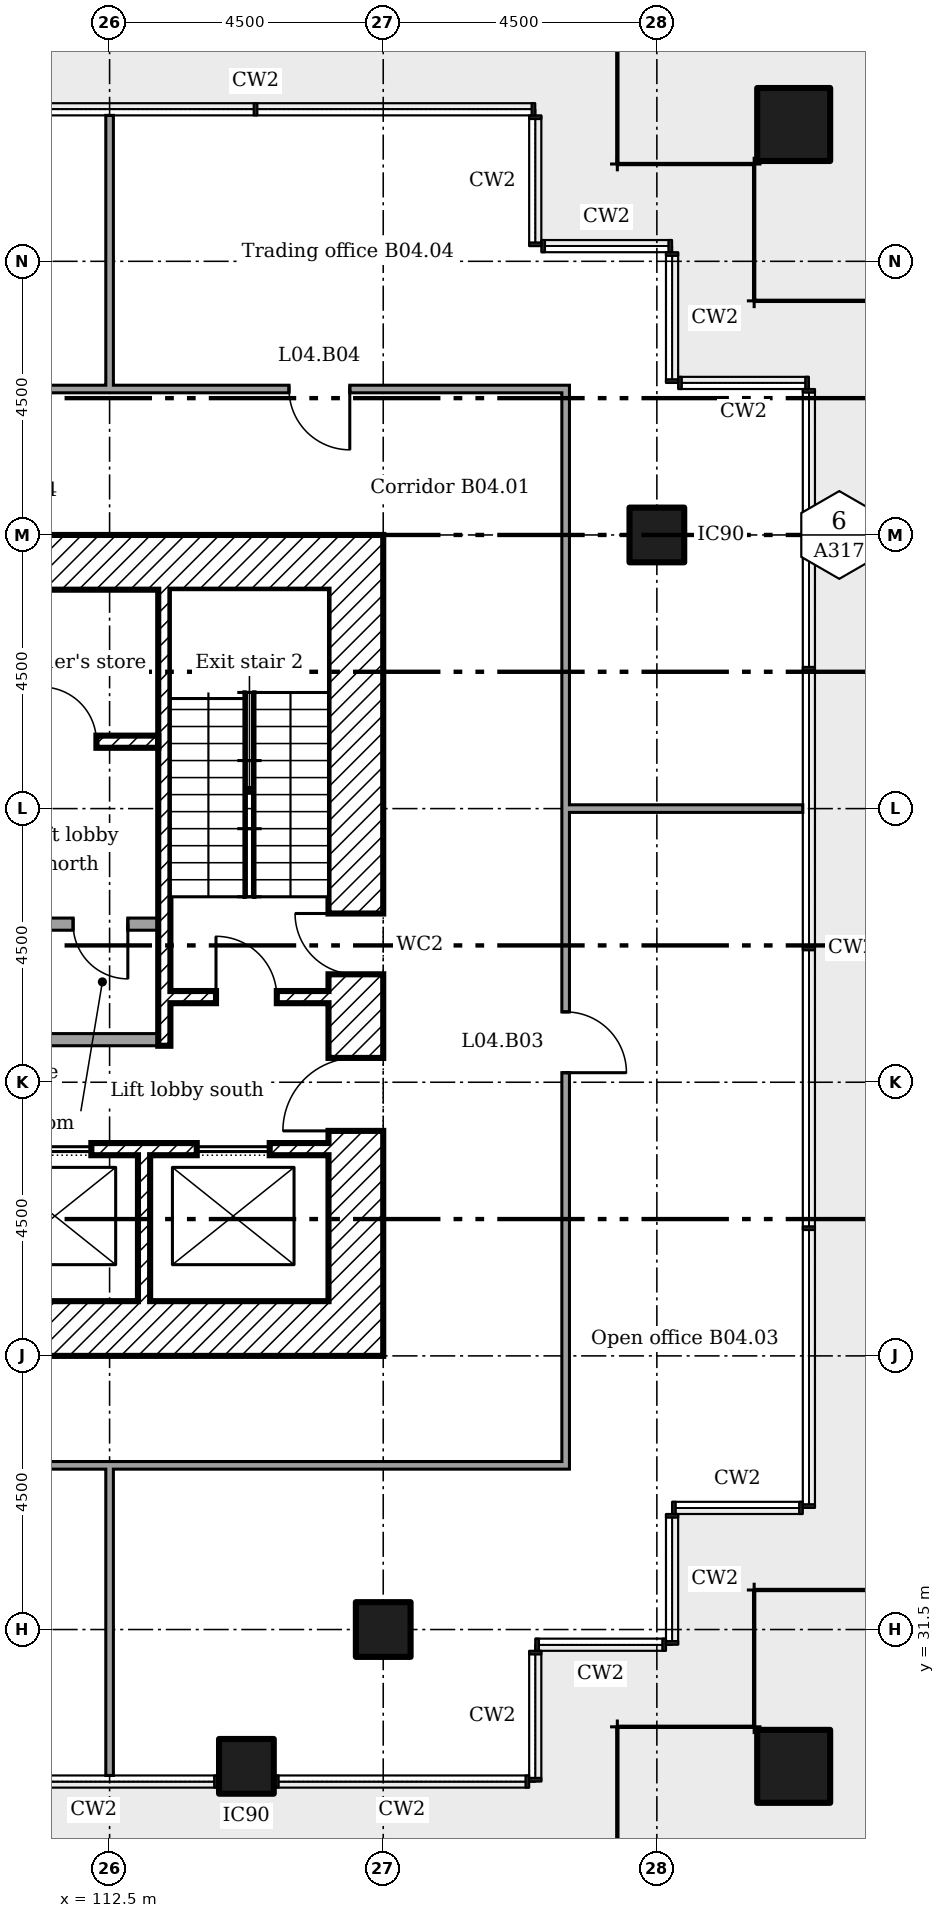
"""IFC4 building model, lengths in metres.
Left out: names, types, materials, properties, quantities, classifications, styles, units other than length and angle.
Written with IfcOpenShell. Run it as: python <this file> out.ifc"""

import sys

from ifc_helpers import new_model, si_unit, direction, frame, frame_2d, origin, origin_2d, place, context, subcontext, project, spatial, rectangle, extrude, element, fill, save


model = new_model("IFC4")
c1 = context("Model", 3, precision=1e-05, world=origin(), true_north=direction((0.0, 1.0)))
c2 = subcontext(c1, "Body", "Model", "MODEL_VIEW")
j1 = project(units=[si_unit("LENGTHUNIT", "METRE"), si_unit("PLANEANGLEUNIT", "RADIAN")], contexts=[c1])
p1 = place(None, origin())
s1 = spatial("IfcSite", under=j1, at=p1, CompositionType="ELEMENT")
p2 = place(p1, origin())
s2 = spatial("IfcBuilding", under=s1, at=p2, CompositionType="ELEMENT")
p3 = place(p2, frame((0.0, 0.0, 21.0)))
s3 = spatial("IfcBuildingStorey", under=s2, at=p3, CompositionType="ELEMENT", Elevation=21.0)
for number, where in (
    (1, (123.75, 29.25, 0.0)),
    (2, (123.75, 56.25, 0.0)),
):
    element("IfcColumn", number, at=place(p3, frame(where)), inside=s3, PredefinedType="COLUMN", context=c2, shape_type="SweptSolid", body=[
        extrude(rectangle(XDim=1.2, YDim=1.2, at=origin_2d()), origin(), (0.0, 0.0, 1.0), 4.4),
    ])
for number, where in (
    (3, (114.75, 29.25, 0.0)),
    (4, (117.0, 31.5, 0.0)),
    (5, (121.5, 49.5, 0.0)),
):
    element("IfcColumn", number, at=place(p3, frame(where)), inside=s3, PredefinedType="COLUMN", context=c2, shape_type="SweptSolid", body=[
        extrude(rectangle(XDim=0.9, YDim=0.9, at=origin_2d()), origin(), (0.0, 0.0, 1.0), 4.4),
    ])
p4 = place(p3, frame((116.55, 36.0, 0.0), z_axis=(0.0, 0.0, 1.0), x_axis=(0.0, 1.0, 0.0)))
e6 = element("IfcWall", 6, at=p4, inside=s3, PredefinedType="SHEAR", context=c2, shape_type="SweptSolid", body=[
    extrude(rectangle(XDim=13.5, YDim=0.9, at=frame_2d((6.75, 0.0))), origin(), (0.0, 0.0, 1.0), 4.125),
])
p5 = place(p4, frame((3.7, 0.0, 0.0)))
e7 = element("IfcOpeningElement", 7, at=p5, cuts=e6, PredefinedType="OPENING", context=c2, shape_type="SweptSolid", body=[
    extrude(rectangle(XDim=1.2, YDim=2.1, at=frame_2d((0.6, 1.05))), frame((0.0, 0.46, 0.0), z_axis=(0.0, -1.0, 0.0), x_axis=(1.0, 0.0, 0.0)), (0.0, 0.0, 1.0), 0.92),
])
p6 = place(p4, frame((6.275, 0.0, 0.0)))
e8 = element("IfcOpeningElement", 8, at=p6, cuts=e6, PredefinedType="OPENING", context=c2, shape_type="SweptSolid", body=[
    extrude(rectangle(XDim=1.0, YDim=2.1, at=frame_2d((0.5, 1.05))), frame((0.0, 0.46, 0.0), z_axis=(0.0, -1.0, 0.0), x_axis=(1.0, 0.0, 0.0)), (0.0, 0.0, 1.0), 0.92),
])
for number, where in (
    (9, (104.4, 49.05, 0.0)),
    (10, (104.4, 36.45, 0.0)),
):
    element("IfcWall", number, at=place(p3, frame(where)), inside=s3, PredefinedType="SHEAR", context=c2, shape_type="SweptSolid", body=[
        extrude(rectangle(XDim=11.7, YDim=0.9, at=frame_2d((5.85, 0.0))), origin(), (0.0, 0.0, 1.0), 4.125),
    ])
p7 = place(p3, frame((113.067, 36.9, 0.0), z_axis=(0.0, 0.0, 1.0), x_axis=(0.0, 1.0, 0.0)))
e11 = element("IfcWall", 11, at=p7, inside=s3, PredefinedType="SHEAR", context=c2, shape_type="SweptSolid", body=[
    extrude(rectangle(XDim=2.4, YDim=0.2, at=frame_2d((1.2, 0.0))), origin(), (0.0, 0.0, 1.0), 4.125),
])
p8 = place(p3, frame((110.467, 46.1, 0.0)))
e12 = element("IfcWall", 12, at=p8, inside=s3, PredefinedType="SHEAR", context=c2, shape_type="SweptSolid", body=[
    extrude(rectangle(XDim=2.833, YDim=0.2, at=frame_2d((1.417, 0.0))), origin(), (0.0, 0.0, 1.0), 4.125),
])
p9 = place(p8, frame((0.917, 0.0, 0.0)))
e13 = element("IfcOpeningElement", 13, at=p9, cuts=e12, PredefinedType="OPENING", context=c2, shape_type="SweptSolid", body=[
    extrude(rectangle(XDim=0.9, YDim=2.1, at=frame_2d((0.45, 1.05))), frame((0.0, 0.11, 0.0), z_axis=(0.0, -1.0, 0.0), x_axis=(1.0, 0.0, 0.0)), (0.0, 0.0, 1.0), 0.22),
])
p10 = place(p3, frame((107.2, 39.4, 0.0)))
e14 = element("IfcWall", 14, at=p10, inside=s3, PredefinedType="SHEAR", context=c2, shape_type="SweptSolid", body=[
    extrude(rectangle(XDim=8.9, YDim=0.2, at=frame_2d((4.45, 0.0))), origin(), (0.0, 0.0, 1.0), 4.125),
])
p11 = place(p10, frame((0.867, 0.0, 0.0)))
e15 = element("IfcOpeningElement", 15, at=p11, cuts=e14, PredefinedType="OPENING", context=c2, shape_type="SweptSolid", body=[
    extrude(rectangle(XDim=1.2, YDim=2.1, at=frame_2d((0.6, 1.05))), frame((0.0, 0.11, 0.0), z_axis=(0.0, -1.0, 0.0), x_axis=(1.0, 0.0, 0.0)), (0.0, 0.0, 1.0), 0.22),
])
p12 = place(p10, frame((3.8, 0.0, 0.0)))
e16 = element("IfcOpeningElement", 16, at=p12, cuts=e14, PredefinedType="OPENING", context=c2, shape_type="SweptSolid", body=[
    extrude(rectangle(XDim=1.2, YDim=2.1, at=frame_2d((0.6, 1.05))), frame((0.0, 0.11, 0.0), z_axis=(0.0, -1.0, 0.0), x_axis=(1.0, 0.0, 0.0)), (0.0, 0.0, 1.0), 0.22),
])
p13 = place(p10, frame((6.733, 0.0, 0.0)))
e17 = element("IfcOpeningElement", 17, at=p13, cuts=e14, PredefinedType="OPENING", context=c2, shape_type="SweptSolid", body=[
    extrude(rectangle(XDim=1.2, YDim=2.1, at=frame_2d((0.6, 1.05))), frame((0.0, 0.11, 0.0), z_axis=(0.0, -1.0, 0.0), x_axis=(1.0, 0.0, 0.0)), (0.0, 0.0, 1.0), 0.22),
])
p14 = place(p3, frame((113.5, 41.9, 0.0)))
e18 = element("IfcWall", 18, at=p14, inside=s3, PredefinedType="SHEAR", context=c2, shape_type="SweptSolid", body=[
    extrude(rectangle(XDim=2.6, YDim=0.2, at=frame_2d((1.3, 0.0))), origin(), (0.0, 0.0, 1.0), 4.125),
])
p15 = place(p14, frame((0.75, 0.0, 0.0)))
e19 = element("IfcOpeningElement", 19, at=p15, cuts=e18, PredefinedType="OPENING", context=c2, shape_type="SweptSolid", body=[
    extrude(rectangle(XDim=1.0, YDim=2.1, at=frame_2d((0.5, 1.05))), frame((0.0, 0.11, 0.0), z_axis=(0.0, -1.0, 0.0), x_axis=(1.0, 0.0, 0.0)), (0.0, 0.0, 1.0), 0.22),
])
p16 = place(p3, frame((113.4, 41.1, 0.0), z_axis=(0.0, 0.0, 1.0), x_axis=(0.0, 1.0, 0.0)))
e20 = element("IfcWall", 20, at=p16, inside=s3, PredefinedType="SHEAR", context=c2, shape_type="SweptSolid", body=[
    extrude(rectangle(XDim=7.5, YDim=0.2, at=frame_2d((3.75, 0.0))), origin(), (0.0, 0.0, 1.0), 4.125),
])
p17 = place(p3, frame((107.2, 43.1, 0.0)))
e21 = element("IfcWall", 21, at=p17, inside=s3, PredefinedType="PARTITIONING", context=c2, shape_type="SweptSolid", body=[
    extrude(rectangle(XDim=6.1, YDim=0.2, at=frame_2d((3.05, 0.0))), origin(), (0.0, 0.0, 1.0), 4.125),
])
p18 = place(p17, frame((4.7, 0.0, 0.0)))
e22 = element("IfcOpeningElement", 22, at=p18, cuts=e21, PredefinedType="OPENING", context=c2, shape_type="SweptSolid", body=[
    extrude(rectangle(XDim=0.9, YDim=2.1, at=frame_2d((0.45, 1.05))), frame((0.0, 0.11, 0.0), z_axis=(0.0, -1.0, 0.0), x_axis=(1.0, 0.0, 0.0)), (0.0, 0.0, 1.0), 0.22),
])
p19 = place(p3, frame((107.2, 41.2, 0.0)))
e23 = element("IfcWall", 23, at=p19, inside=s3, PredefinedType="PARTITIONING", context=c2, shape_type="SweptSolid", body=[
    extrude(rectangle(XDim=6.1, YDim=0.2, at=frame_2d((3.05, 0.0))), origin(), (0.0, 0.0, 1.0), 4.125),
])
p20 = place(p19, frame((0.7, 0.0, 0.0)))
e24 = element("IfcOpeningElement", 24, at=p20, cuts=e23, PredefinedType="OPENING", context=c2, shape_type="SweptSolid", body=[
    extrude(rectangle(XDim=0.9, YDim=2.1, at=frame_2d((0.45, 1.05))), frame((0.0, 0.11, 0.0), z_axis=(0.0, -1.0, 0.0), x_axis=(1.0, 0.0, 0.0)), (0.0, 0.0, 1.0), 0.22),
])
p21 = place(p19, frame((2.8, 0.0, 0.0)))
e25 = element("IfcOpeningElement", 25, at=p21, cuts=e23, PredefinedType="OPENING", context=c2, shape_type="SweptSolid", body=[
    extrude(rectangle(XDim=0.9, YDim=2.1, at=frame_2d((0.45, 1.05))), frame((0.0, 0.11, 0.0), z_axis=(0.0, -1.0, 0.0), x_axis=(1.0, 0.0, 0.0)), (0.0, 0.0, 1.0), 0.22),
])
p22 = place(p3, frame((101.038, 34.2, 0.0)))
e26 = element("IfcWall", 26, at=p22, inside=s3, PredefinedType="PARTITIONING", context=c2, shape_type="SweptSolid", body=[
    extrude(rectangle(XDim=19.025, YDim=0.125, at=frame_2d((9.512, 0.0))), origin(), (0.0, 0.0, 1.0), 4.225),
])
p23 = place(p22, frame((5.219, 0.0, 0.0)))
e27 = element("IfcOpeningElement", 27, at=p23, cuts=e26, PredefinedType="OPENING", context=c2, shape_type="SweptSolid", body=[
    extrude(rectangle(XDim=1.0, YDim=2.1, at=frame_2d((0.5, 1.05))), frame((0.0, 0.073, 0.0), z_axis=(0.0, -1.0, 0.0), x_axis=(1.0, 0.0, 0.0)), (0.0, 0.0, 1.0), 0.145),
])
p24 = place(p3, frame((120.0, 45.0, 0.0)))
e28 = element("IfcWall", 28, at=p24, inside=s3, PredefinedType="PARTITIONING", context=c2, shape_type="SweptSolid", body=[
    extrude(rectangle(XDim=3.9, YDim=0.125, at=frame_2d((1.95, 0.0))), origin(), (0.0, 0.0, 1.0), 3.613),
])
p25 = place(p3, frame((101.038, 51.9, 0.0)))
e29 = element("IfcWall", 29, at=p25, inside=s3, PredefinedType="PARTITIONING", context=c2, shape_type="SweptSolid", body=[
    extrude(rectangle(XDim=19.025, YDim=0.125, at=frame_2d((9.512, 0.0))), origin(), (0.0, 0.0, 1.0), 4.225),
])
p26 = place(p25, frame((14.413, 0.0, 0.0)))
e30 = element("IfcOpeningElement", 30, at=p26, cuts=e29, PredefinedType="OPENING", context=c2, shape_type="SweptSolid", body=[
    extrude(rectangle(XDim=1.0, YDim=2.1, at=frame_2d((0.5, 1.05))), frame((0.0, 0.073, 0.0), z_axis=(0.0, -1.0, 0.0), x_axis=(1.0, 0.0, 0.0)), (0.0, 0.0, 1.0), 0.145),
])
p27 = place(p25, frame((5.219, 0.0, 0.0)))
e31 = element("IfcOpeningElement", 31, at=p27, cuts=e29, PredefinedType="OPENING", context=c2, shape_type="SweptSolid", body=[
    extrude(rectangle(XDim=1.0, YDim=2.1, at=frame_2d((0.5, 1.05))), frame((0.0, 0.073, 0.0), z_axis=(0.0, -1.0, 0.0), x_axis=(1.0, 0.0, 0.0)), (0.0, 0.0, 1.0), 0.145),
])
p28 = place(p3, frame((112.5, 29.1, 0.0), z_axis=(0.0, 0.0, 1.0), x_axis=(0.0, 1.0, 0.0)))
e32 = element("IfcWall", 32, at=p28, inside=s3, PredefinedType="PARTITIONING", context=c2, shape_type="SweptSolid", body=[
    extrude(rectangle(XDim=5.1, YDim=0.125, at=frame_2d((2.55, 0.0))), origin(), (0.0, 0.0, 1.0), 3.613),
])
p29 = place(p3, frame((112.5, 51.9, 0.0), z_axis=(0.0, 0.0, 1.0), x_axis=(0.0, 1.0, 0.0)))
e33 = element("IfcWall", 33, at=p29, inside=s3, PredefinedType="PARTITIONING", context=c2, shape_type="SweptSolid", body=[
    extrude(rectangle(XDim=4.5, YDim=0.125, at=frame_2d((2.25, 0.0))), origin(), (0.0, 0.0, 1.0), 3.613),
])
p30 = place(p3, frame((120.0, 34.262, 0.0), z_axis=(0.0, 0.0, 1.0), x_axis=(0.0, 1.0, 0.0)))
e34 = element("IfcWall", 34, at=p30, inside=s3, PredefinedType="PARTITIONING", context=c2, shape_type="SweptSolid", body=[
    extrude(rectangle(XDim=17.575, YDim=0.125, at=frame_2d((8.788, 0.0))), origin(), (0.0, 0.0, 1.0), 4.225),
])
p31 = place(p30, frame((6.395, 0.0, 0.0)))
e35 = element("IfcOpeningElement", 35, at=p31, cuts=e34, PredefinedType="OPENING", context=c2, shape_type="SweptSolid", body=[
    extrude(rectangle(XDim=1.0, YDim=2.1, at=frame_2d((0.5, 1.05))), frame((0.0, 0.073, 0.0), z_axis=(0.0, -1.0, 0.0), x_axis=(1.0, 0.0, 0.0)), (0.0, 0.0, 1.0), 0.145),
])
p32 = place(p5, origin())
e36 = element("IfcDoor", 36, at=p32, inside=s3, OperationType="SINGLE_SWING_RIGHT", PredefinedType="DOOR", context=c2, shape_type="SweptSolid", body=[
    extrude(rectangle(XDim=1.2, YDim=2.1, at=frame_2d((0.6, 1.05))), frame((0.0, 0.025, 0.0), z_axis=(0.0, -1.0, 0.0), x_axis=(1.0, 0.0, 0.0)), (0.0, 0.0, 1.0), 0.05),
])
fill(e7, e36)
p33 = place(p15, origin())
e37 = element("IfcDoor", 37, at=p33, inside=s3, OperationType="SINGLE_SWING_RIGHT", PredefinedType="DOOR", context=c2, shape_type="SweptSolid", body=[
    extrude(rectangle(XDim=1.0, YDim=2.1, at=frame_2d((0.5, 1.05))), frame((0.0, 0.025, 0.0), z_axis=(0.0, -1.0, 0.0), x_axis=(1.0, 0.0, 0.0)), (0.0, 0.0, 1.0), 0.05),
])
fill(e19, e37)
p34 = place(p6, origin())
e38 = element("IfcDoor", 38, at=p34, inside=s3, OperationType="SINGLE_SWING_LEFT", PredefinedType="DOOR", context=c2, shape_type="SweptSolid", body=[
    extrude(rectangle(XDim=1.0, YDim=2.1, at=frame_2d((0.5, 1.05))), frame((0.0, 0.025, 0.0), z_axis=(0.0, -1.0, 0.0), x_axis=(1.0, 0.0, 0.0)), (0.0, 0.0, 1.0), 0.05),
])
fill(e8, e38)
p35 = place(p9, origin())
e39 = element("IfcDoor", 39, at=p35, inside=s3, OperationType="SINGLE_SWING_RIGHT", PredefinedType="DOOR", context=c2, shape_type="SweptSolid", body=[
    extrude(rectangle(XDim=0.9, YDim=2.1, at=frame_2d((0.45, 1.05))), frame((0.0, 0.025, 0.0), z_axis=(0.0, -1.0, 0.0), x_axis=(1.0, 0.0, 0.0)), (0.0, 0.0, 1.0), 0.05),
])
fill(e13, e39)
p36 = place(p18, frame((0.9, 0.0, 0.0), x_axis=(-1.0, 0.0, 0.0)))
e40 = element("IfcDoor", 40, at=p36, inside=s3, OperationType="SINGLE_SWING_RIGHT", PredefinedType="DOOR", context=c2, shape_type="SweptSolid", body=[
    extrude(rectangle(XDim=0.9, YDim=2.1, at=frame_2d((0.45, 1.05))), frame((0.0, 0.025, 0.0), z_axis=(0.0, -1.0, 0.0), x_axis=(1.0, 0.0, 0.0)), (0.0, 0.0, 1.0), 0.05),
])
fill(e22, e40)
p37 = place(p12, origin())
e41 = element("IfcDoor", 41, at=p37, inside=s3, OperationType="SLIDING_TO_LEFT", PredefinedType="DOOR", context=c2, shape_type="SweptSolid", body=[
    extrude(rectangle(XDim=1.2, YDim=2.1, at=frame_2d((0.6, 1.05))), frame((0.0, 0.025, 0.0), z_axis=(0.0, -1.0, 0.0), x_axis=(1.0, 0.0, 0.0)), (0.0, 0.0, 1.0), 0.05),
])
fill(e16, e41)
p38 = place(p13, origin())
e42 = element("IfcDoor", 42, at=p38, inside=s3, OperationType="SLIDING_TO_LEFT", PredefinedType="DOOR", context=c2, shape_type="SweptSolid", body=[
    extrude(rectangle(XDim=1.2, YDim=2.1, at=frame_2d((0.6, 1.05))), frame((0.0, 0.025, 0.0), z_axis=(0.0, -1.0, 0.0), x_axis=(1.0, 0.0, 0.0)), (0.0, 0.0, 1.0), 0.05),
])
fill(e17, e42)
p39 = place(p31, frame((1.0, 0.0, 0.0), x_axis=(-1.0, 0.0, 0.0)))
e43 = element("IfcDoor", 43, at=p39, inside=s3, OperationType="SINGLE_SWING_LEFT", PredefinedType="DOOR", context=c2, shape_type="SweptSolid", body=[
    extrude(rectangle(XDim=1.0, YDim=2.1, at=frame_2d((0.5, 1.05))), frame((0.0, 0.025, 0.0), z_axis=(0.0, -1.0, 0.0), x_axis=(1.0, 0.0, 0.0)), (0.0, 0.0, 1.0), 0.05),
])
fill(e35, e43)
p40 = place(p26, frame((1.0, 0.0, 0.0), x_axis=(-1.0, 0.0, 0.0)))
e44 = element("IfcDoor", 44, at=p40, inside=s3, OperationType="SINGLE_SWING_RIGHT", PredefinedType="DOOR", context=c2, shape_type="SweptSolid", body=[
    extrude(rectangle(XDim=1.0, YDim=2.1, at=frame_2d((0.5, 1.05))), frame((0.0, 0.025, 0.0), z_axis=(0.0, -1.0, 0.0), x_axis=(1.0, 0.0, 0.0)), (0.0, 0.0, 1.0), 0.05),
])
fill(e30, e44)
save(model, sys.argv[1])
